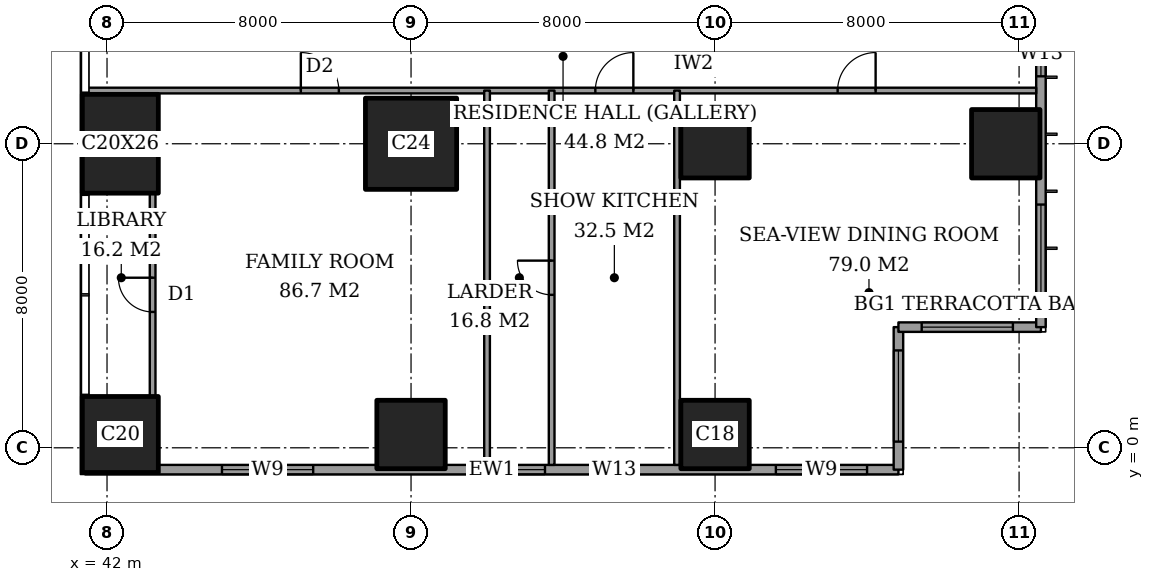
"""IFC4 building model, lengths in metres.
Left out: names, types, materials, properties, quantities, classifications, styles, units other than length and angle.
Written with IfcOpenShell. Run it as: python <this file> out.ifc"""

import sys

from ifc_helpers import new_model, si_unit, direction, frame, frame_2d, origin, origin_2d, place, context, subcontext, project, spatial, rectangle, extrude, element, fill, save


model = new_model("IFC4")
c1 = context("Model", 3, precision=1e-05, world=origin(), true_north=direction((0.0, 1.0)))
c2 = subcontext(c1, "Body", "Model", "MODEL_VIEW")
j1 = project(units=[si_unit("LENGTHUNIT", "METRE"), si_unit("PLANEANGLEUNIT", "RADIAN")], contexts=[c1])
p1 = place(None, origin())
s1 = spatial("IfcSite", under=j1, at=p1, CompositionType="ELEMENT")
p2 = place(p1, origin())
s2 = spatial("IfcBuilding", under=s1, at=p2, CompositionType="ELEMENT")
p3 = place(p2, frame((0.0, 0.0, 207.4)))
s3 = spatial("IfcBuildingStorey", under=s2, at=p3, CompositionType="ELEMENT", Elevation=207.4)
p4 = place(p3, frame((42.35, 0.35, 0.0), z_axis=(0.0, 0.0, 1.0), x_axis=(1.0, 0.0, 0.0)))
e1 = element("IfcColumn", 1, at=p4, inside=s3, PredefinedType="COLUMN", context=c2, shape_type="SweptSolid", body=[
    extrude(rectangle(XDim=2.0, YDim=2.0, at=origin_2d()), origin(), (0.0, 0.0, 1.0), 3.6),
])
p5 = place(p3, frame((42.35, 8.0, 0.0), z_axis=(0.0, 0.0, 1.0), x_axis=(1.0, 0.0, 0.0)))
e2 = element("IfcColumn", 2, at=p5, inside=s3, PredefinedType="COLUMN", context=c2, shape_type="SweptSolid", body=[
    extrude(rectangle(XDim=2.0, YDim=2.6, at=origin_2d()), origin(), (0.0, 0.0, 1.0), 3.6),
])
p6 = place(p3, frame((50.0, 0.35, 0.0), z_axis=(0.0, 0.0, 1.0), x_axis=(1.0, 0.0, 0.0)))
e3 = element("IfcColumn", 3, at=p6, inside=s3, PredefinedType="COLUMN", context=c2, shape_type="SweptSolid", body=[
    extrude(rectangle(XDim=1.8, YDim=1.8, at=origin_2d()), origin(), (0.0, 0.0, 1.0), 3.6),
])
p7 = place(p3, frame((50.0, 8.0, 0.0), z_axis=(0.0, 0.0, 1.0), x_axis=(1.0, 0.0, 0.0)))
e4 = element("IfcColumn", 4, at=p7, inside=s3, PredefinedType="COLUMN", context=c2, shape_type="SweptSolid", body=[
    extrude(rectangle(XDim=2.4, YDim=2.4, at=origin_2d()), origin(), (0.0, 0.0, 1.0), 3.6),
])
for number, where, z_axis, x_axis in (
    (5, (58.0, 0.35, 0.0), (0.0, 0.0, 1.0), (1.0, 0.0, 0.0)),
    (6, (58.0, 8.0, 0.0), (0.0, 0.0, 1.0), (1.0, 0.0, 0.0)),
    (7, (65.65, 8.0, 0.0), (0.0, 0.0, 1.0), (1.0, 0.0, 0.0)),
):
    element("IfcColumn", number, at=place(p3, frame(where, z_axis=z_axis, x_axis=x_axis)), inside=s3, PredefinedType="COLUMN", context=c2, shape_type="SweptSolid", body=[
        extrude(rectangle(XDim=1.8, YDim=1.8, at=origin_2d()), origin(), (0.0, 0.0, 1.0), 3.6),
    ])
p8 = place(p3, frame((41.425, -0.575, 0.0), z_axis=(0.0, 0.0, 1.0), x_axis=(1.0, 0.0, 0.0)))
e8 = element("IfcWall", 8, at=p8, inside=s3, PredefinedType="SOLIDWALL", context=c2, shape_type="SweptSolid", body=[
    extrude(rectangle(XDim=21.4, YDim=0.25, at=frame_2d((10.7, 0.0))), origin(), (0.0, 0.0, 1.0), 3.6),
])
p9 = place(p8, frame((3.6, 0.0, 0.2)))
e9 = element("IfcOpeningElement", 9, at=p9, cuts=e8, PredefinedType="OPENING", context=c2, shape_type="SweptSolid", body=[
    extrude(rectangle(XDim=2.4, YDim=2.4, at=frame_2d((1.2, 1.2))), frame((0.0, 0.135, 0.0), z_axis=(0.0, -1.0, 0.0), x_axis=(1.0, 0.0, 0.0)), (0.0, 0.0, 1.0), 0.27),
])
p10 = place(p8, frame((10.9, 0.0, 0.2)))
e10 = element("IfcOpeningElement", 10, at=p10, cuts=e8, PredefinedType="OPENING", context=c2, shape_type="SweptSolid", body=[
    extrude(rectangle(XDim=1.2, YDim=2.4, at=frame_2d((0.6, 1.2))), frame((0.0, 0.135, 0.0), z_axis=(0.0, -1.0, 0.0), x_axis=(1.0, 0.0, 0.0)), (0.0, 0.0, 1.0), 0.27),
])
p11 = place(p8, frame((13.325, 0.0, 0.2)))
e11 = element("IfcOpeningElement", 11, at=p11, cuts=e8, PredefinedType="OPENING", context=c2, shape_type="SweptSolid", body=[
    extrude(rectangle(XDim=1.2, YDim=2.4, at=frame_2d((0.6, 1.2))), frame((0.0, 0.135, 0.0), z_axis=(0.0, -1.0, 0.0), x_axis=(1.0, 0.0, 0.0)), (0.0, 0.0, 1.0), 0.27),
])
p12 = place(p8, frame((18.175, 0.0, 0.2)))
e12 = element("IfcOpeningElement", 12, at=p12, cuts=e8, PredefinedType="OPENING", context=c2, shape_type="SweptSolid", body=[
    extrude(rectangle(XDim=2.4, YDim=2.4, at=frame_2d((1.2, 1.2))), frame((0.0, 0.135, 0.0), z_axis=(0.0, -1.0, 0.0), x_axis=(1.0, 0.0, 0.0)), (0.0, 0.0, 1.0), 0.27),
])
p13 = place(p3, frame((62.825, -0.575, 0.0), z_axis=(0.0, 0.0, 1.0), x_axis=(0.0, 1.0, 0.0)))
e13 = element("IfcWall", 13, at=p13, inside=s3, PredefinedType="SOLIDWALL", context=c2, shape_type="SweptSolid", body=[
    extrude(rectangle(XDim=3.75, YDim=0.25, at=frame_2d((1.875, 0.0))), origin(), (0.0, 0.0, 1.0), 3.6),
])
p14 = place(p13, frame((0.738, 0.0, 0.2)))
e14 = element("IfcOpeningElement", 14, at=p14, cuts=e13, PredefinedType="OPENING", context=c2, shape_type="SweptSolid", body=[
    extrude(rectangle(XDim=2.4, YDim=2.4, at=frame_2d((1.2, 1.2))), frame((0.0, 0.135, 0.0), z_axis=(0.0, -1.0, 0.0), x_axis=(1.0, 0.0, 0.0)), (0.0, 0.0, 1.0), 0.27),
])
p15 = place(p3, frame((62.825, 3.175, 0.0), z_axis=(0.0, 0.0, 1.0), x_axis=(1.0, 0.0, 0.0)))
e15 = element("IfcWall", 15, at=p15, inside=s3, PredefinedType="SOLIDWALL", context=c2, shape_type="SweptSolid", body=[
    extrude(rectangle(XDim=3.75, YDim=0.25, at=frame_2d((1.875, 0.0))), origin(), (0.0, 0.0, 1.0), 3.6),
])
p16 = place(p15, frame((0.613, 0.0, 0.2)))
e16 = element("IfcOpeningElement", 16, at=p16, cuts=e15, PredefinedType="OPENING", context=c2, shape_type="SweptSolid", body=[
    extrude(rectangle(XDim=2.4, YDim=2.4, at=frame_2d((1.2, 1.2))), frame((0.0, 0.135, 0.0), z_axis=(0.0, -1.0, 0.0), x_axis=(1.0, 0.0, 0.0)), (0.0, 0.0, 1.0), 0.27),
])
p17 = place(p3, frame((66.575, 3.175, 0.0), z_axis=(0.0, 0.0, 1.0), x_axis=(0.0, 1.0, 0.0)))
e17 = element("IfcWall", 17, at=p17, inside=s3, PredefinedType="SOLIDWALL", context=c2, shape_type="SweptSolid", body=[
    extrude(rectangle(XDim=41.65, YDim=0.25, at=frame_2d((20.825, 0.0))), origin(), (0.0, 0.0, 1.0), 3.6),
])
p18 = place(p17, frame((0.825, 0.0, 0.2)))
e18 = element("IfcOpeningElement", 18, at=p18, cuts=e17, PredefinedType="OPENING", context=c2, shape_type="SweptSolid", body=[
    extrude(rectangle(XDim=2.4, YDim=2.4, at=frame_2d((1.2, 1.2))), frame((0.0, 0.135, 0.0), z_axis=(0.0, -1.0, 0.0), x_axis=(1.0, 0.0, 0.0)), (0.0, 0.0, 1.0), 0.27),
])
p19 = place(p17, frame((6.6, 0.0, 0.2)))
e19 = element("IfcOpeningElement", 19, at=p19, cuts=e17, PredefinedType="OPENING", context=c2, shape_type="SweptSolid", body=[
    extrude(rectangle(XDim=1.2, YDim=2.4, at=frame_2d((0.6, 1.2))), frame((0.0, 0.135, 0.0), z_axis=(0.0, -1.0, 0.0), x_axis=(1.0, 0.0, 0.0)), (0.0, 0.0, 1.0), 0.27),
])
p20 = place(p17, frame((8.775, 0.0, 0.2)))
e20 = element("IfcOpeningElement", 20, at=p20, cuts=e17, PredefinedType="OPENING", context=c2, shape_type="SweptSolid", body=[
    extrude(rectangle(XDim=2.4, YDim=2.4, at=frame_2d((1.2, 1.2))), frame((0.0, 0.135, 0.0), z_axis=(0.0, -1.0, 0.0), x_axis=(1.0, 0.0, 0.0)), (0.0, 0.0, 1.0), 0.27),
])
p21 = place(p17, frame((15.675, 0.0, 0.2)))
e21 = element("IfcOpeningElement", 21, at=p21, cuts=e17, PredefinedType="OPENING", context=c2, shape_type="SweptSolid", body=[
    extrude(rectangle(XDim=2.4, YDim=2.4, at=frame_2d((1.2, 1.2))), frame((0.0, 0.135, 0.0), z_axis=(0.0, -1.0, 0.0), x_axis=(1.0, 0.0, 0.0)), (0.0, 0.0, 1.0), 0.27),
])
p22 = place(p17, frame((23.575, 0.0, 0.2)))
e22 = element("IfcOpeningElement", 22, at=p22, cuts=e17, PredefinedType="OPENING", context=c2, shape_type="SweptSolid", body=[
    extrude(rectangle(XDim=2.4, YDim=2.4, at=frame_2d((1.2, 1.2))), frame((0.0, 0.135, 0.0), z_axis=(0.0, -1.0, 0.0), x_axis=(1.0, 0.0, 0.0)), (0.0, 0.0, 1.0), 0.27),
])
p23 = place(p17, frame((30.675, 0.0, 0.2)))
e23 = element("IfcOpeningElement", 23, at=p23, cuts=e17, PredefinedType="OPENING", context=c2, shape_type="SweptSolid", body=[
    extrude(rectangle(XDim=2.4, YDim=2.4, at=frame_2d((1.2, 1.2))), frame((0.0, 0.135, 0.0), z_axis=(0.0, -1.0, 0.0), x_axis=(1.0, 0.0, 0.0)), (0.0, 0.0, 1.0), 0.27),
])
p24 = place(p17, frame((34.325, 0.0, 0.2)))
e24 = element("IfcOpeningElement", 24, at=p24, cuts=e17, PredefinedType="OPENING", context=c2, shape_type="SweptSolid", body=[
    extrude(rectangle(XDim=1.2, YDim=2.4, at=frame_2d((0.6, 1.2))), frame((0.0, 0.135, 0.0), z_axis=(0.0, -1.0, 0.0), x_axis=(1.0, 0.0, 0.0)), (0.0, 0.0, 1.0), 0.27),
])
p25 = place(p17, frame((38.425, 0.0, 0.2)))
e25 = element("IfcOpeningElement", 25, at=p25, cuts=e17, PredefinedType="OPENING", context=c2, shape_type="SweptSolid", body=[
    extrude(rectangle(XDim=2.4, YDim=2.4, at=frame_2d((1.2, 1.2))), frame((0.0, 0.135, 0.0), z_axis=(0.0, -1.0, 0.0), x_axis=(1.0, 0.0, 0.0)), (0.0, 0.0, 1.0), 0.27),
])
p26 = place(p3, frame((41.439, 9.4, 0.0), z_axis=(0.0, 0.0, 1.0), x_axis=(1.0, 0.0, 0.0)))
e26 = element("IfcWall", 26, at=p26, inside=s3, PredefinedType="PARTITIONING", context=c2, shape_type="SweptSolid", body=[
    extrude(rectangle(XDim=25.011, YDim=0.15, at=frame_2d((12.505, 0.0))), origin(), (0.0, 0.0, 1.0), 3.35),
])
p27 = place(p26, frame((19.786, 0.0, 0.0)))
e27 = element("IfcOpeningElement", 27, at=p27, cuts=e26, PredefinedType="OPENING", context=c2, shape_type="SweptSolid", body=[
    extrude(rectangle(XDim=1.0, YDim=2.1, at=frame_2d((0.5, 1.05))), frame((0.0, 0.085, 0.0), z_axis=(0.0, -1.0, 0.0), x_axis=(1.0, 0.0, 0.0)), (0.0, 0.0, 1.0), 0.17),
])
p28 = place(p26, frame((13.411, 0.0, 0.0)))
e28 = element("IfcOpeningElement", 28, at=p28, cuts=e26, PredefinedType="OPENING", context=c2, shape_type="SweptSolid", body=[
    extrude(rectangle(XDim=1.0, YDim=2.1, at=frame_2d((0.5, 1.05))), frame((0.0, 0.085, 0.0), z_axis=(0.0, -1.0, 0.0), x_axis=(1.0, 0.0, 0.0)), (0.0, 0.0, 1.0), 0.17),
])
p29 = place(p26, frame((5.661, 0.0, 0.0)))
e29 = element("IfcOpeningElement", 29, at=p29, cuts=e26, PredefinedType="OPENING", context=c2, shape_type="SweptSolid", body=[
    extrude(rectangle(XDim=1.0, YDim=2.1, at=frame_2d((0.5, 1.05))), frame((0.0, 0.085, 0.0), z_axis=(0.0, -1.0, 0.0), x_axis=(1.0, 0.0, 0.0)), (0.0, 0.0, 1.0), 0.17),
])
p30 = place(p3, frame((43.2, 1.35, 0.0), z_axis=(0.0, 0.0, 1.0), x_axis=(0.0, 1.0, 0.0)))
e30 = element("IfcWall", 30, at=p30, inside=s3, PredefinedType="PARTITIONING", context=c2, shape_type="SweptSolid", body=[
    extrude(rectangle(XDim=5.35, YDim=0.15, at=frame_2d((2.675, 0.0))), origin(), (0.0, 0.0, 1.0), 3.35),
])
p31 = place(p30, frame((2.225, 0.0, 0.0)))
e31 = element("IfcOpeningElement", 31, at=p31, cuts=e30, PredefinedType="OPENING", context=c2, shape_type="SweptSolid", body=[
    extrude(rectangle(XDim=0.9, YDim=2.1, at=frame_2d((0.45, 1.05))), frame((0.0, 0.085, 0.0), z_axis=(0.0, -1.0, 0.0), x_axis=(1.0, 0.0, 0.0)), (0.0, 0.0, 1.0), 0.17),
])
p32 = place(p3, frame((52.0, -0.45, 0.0), z_axis=(0.0, 0.0, 1.0), x_axis=(0.0, 1.0, 0.0)))
e32 = element("IfcWall", 32, at=p32, inside=s3, PredefinedType="PARTITIONING", context=c2, shape_type="SweptSolid", body=[
    extrude(rectangle(XDim=9.85, YDim=0.15, at=frame_2d((4.925, 0.0))), origin(), (0.0, 0.0, 1.0), 3.35),
])
p33 = place(p3, frame((53.7, -0.45, 0.0), z_axis=(0.0, 0.0, 1.0), x_axis=(0.0, 1.0, 0.0)))
e33 = element("IfcWall", 33, at=p33, inside=s3, PredefinedType="PARTITIONING", context=c2, shape_type="SweptSolid", body=[
    extrude(rectangle(XDim=9.85, YDim=0.15, at=frame_2d((4.925, 0.0))), origin(), (0.0, 0.0, 1.0), 3.35),
])
p34 = place(p33, frame((4.475, 0.0, 0.0)))
e34 = element("IfcOpeningElement", 34, at=p34, cuts=e33, PredefinedType="OPENING", context=c2, shape_type="SweptSolid", body=[
    extrude(rectangle(XDim=0.9, YDim=2.1, at=frame_2d((0.45, 1.05))), frame((0.0, 0.085, 0.0), z_axis=(0.0, -1.0, 0.0), x_axis=(1.0, 0.0, 0.0)), (0.0, 0.0, 1.0), 0.17),
])
p35 = place(p3, frame((57.0, -0.45, 0.0), z_axis=(0.0, 0.0, 1.0), x_axis=(0.0, 1.0, 0.0)))
e35 = element("IfcWall", 35, at=p35, inside=s3, PredefinedType="PARTITIONING", context=c2, shape_type="SweptSolid", body=[
    extrude(rectangle(XDim=9.85, YDim=0.15, at=frame_2d((4.925, 0.0))), origin(), (0.0, 0.0, 1.0), 3.35),
])
p36 = place(p9, origin())
e36 = element("IfcWindow", 36, at=p36, inside=s3, PartitioningType="SINGLE_PANEL", PredefinedType="WINDOW", context=c2, shape_type="SweptSolid", body=[
    extrude(rectangle(XDim=2.4, YDim=2.4, at=frame_2d((1.2, 1.2))), frame((0.0, 0.03, 0.0), z_axis=(0.0, -1.0, 0.0), x_axis=(1.0, 0.0, 0.0)), (0.0, 0.0, 1.0), 0.06),
])
fill(e9, e36)
p37 = place(p10, origin())
e37 = element("IfcWindow", 37, at=p37, inside=s3, PartitioningType="SINGLE_PANEL", PredefinedType="WINDOW", context=c2, shape_type="SweptSolid", body=[
    extrude(rectangle(XDim=1.2, YDim=2.4, at=frame_2d((0.6, 1.2))), frame((0.0, 0.03, 0.0), z_axis=(0.0, -1.0, 0.0), x_axis=(1.0, 0.0, 0.0)), (0.0, 0.0, 1.0), 0.06),
])
fill(e10, e37)
p38 = place(p11, origin())
e38 = element("IfcWindow", 38, at=p38, inside=s3, PartitioningType="SINGLE_PANEL", PredefinedType="WINDOW", context=c2, shape_type="SweptSolid", body=[
    extrude(rectangle(XDim=1.2, YDim=2.4, at=frame_2d((0.6, 1.2))), frame((0.0, 0.03, 0.0), z_axis=(0.0, -1.0, 0.0), x_axis=(1.0, 0.0, 0.0)), (0.0, 0.0, 1.0), 0.06),
])
fill(e11, e38)
p39 = place(p12, origin())
e39 = element("IfcWindow", 39, at=p39, inside=s3, PartitioningType="SINGLE_PANEL", PredefinedType="WINDOW", context=c2, shape_type="SweptSolid", body=[
    extrude(rectangle(XDim=2.4, YDim=2.4, at=frame_2d((1.2, 1.2))), frame((0.0, 0.03, 0.0), z_axis=(0.0, -1.0, 0.0), x_axis=(1.0, 0.0, 0.0)), (0.0, 0.0, 1.0), 0.06),
])
fill(e12, e39)
p40 = place(p14, origin())
e40 = element("IfcWindow", 40, at=p40, inside=s3, PartitioningType="SINGLE_PANEL", PredefinedType="WINDOW", context=c2, shape_type="SweptSolid", body=[
    extrude(rectangle(XDim=2.4, YDim=2.4, at=frame_2d((1.2, 1.2))), frame((0.0, 0.03, 0.0), z_axis=(0.0, -1.0, 0.0), x_axis=(1.0, 0.0, 0.0)), (0.0, 0.0, 1.0), 0.06),
])
fill(e14, e40)
p41 = place(p16, origin())
e41 = element("IfcWindow", 41, at=p41, inside=s3, PartitioningType="SINGLE_PANEL", PredefinedType="WINDOW", context=c2, shape_type="SweptSolid", body=[
    extrude(rectangle(XDim=2.4, YDim=2.4, at=frame_2d((1.2, 1.2))), frame((0.0, 0.03, 0.0), z_axis=(0.0, -1.0, 0.0), x_axis=(1.0, 0.0, 0.0)), (0.0, 0.0, 1.0), 0.06),
])
fill(e16, e41)
p42 = place(p18, origin())
e42 = element("IfcWindow", 42, at=p42, inside=s3, PartitioningType="SINGLE_PANEL", PredefinedType="WINDOW", context=c2, shape_type="SweptSolid", body=[
    extrude(rectangle(XDim=2.4, YDim=2.4, at=frame_2d((1.2, 1.2))), frame((0.0, 0.03, 0.0), z_axis=(0.0, -1.0, 0.0), x_axis=(1.0, 0.0, 0.0)), (0.0, 0.0, 1.0), 0.06),
])
fill(e18, e42)
p43 = place(p19, origin())
e43 = element("IfcWindow", 43, at=p43, inside=s3, PartitioningType="SINGLE_PANEL", PredefinedType="WINDOW", context=c2, shape_type="SweptSolid", body=[
    extrude(rectangle(XDim=1.2, YDim=2.4, at=frame_2d((0.6, 1.2))), frame((0.0, 0.03, 0.0), z_axis=(0.0, -1.0, 0.0), x_axis=(1.0, 0.0, 0.0)), (0.0, 0.0, 1.0), 0.06),
])
fill(e19, e43)
p44 = place(p27, origin())
e44 = element("IfcDoor", 44, at=p44, inside=s3, OperationType="SINGLE_SWING_LEFT", PredefinedType="DOOR", context=c2, shape_type="SweptSolid", body=[
    extrude(rectangle(XDim=1.0, YDim=2.1, at=frame_2d((0.5, 1.05))), frame((0.0, 0.025, 0.0), z_axis=(0.0, -1.0, 0.0), x_axis=(1.0, 0.0, 0.0)), (0.0, 0.0, 1.0), 0.05),
])
fill(e27, e44)
p45 = place(p28, origin())
e45 = element("IfcDoor", 45, at=p45, inside=s3, OperationType="SINGLE_SWING_LEFT", PredefinedType="DOOR", context=c2, shape_type="SweptSolid", body=[
    extrude(rectangle(XDim=1.0, YDim=2.1, at=frame_2d((0.5, 1.05))), frame((0.0, 0.025, 0.0), z_axis=(0.0, -1.0, 0.0), x_axis=(1.0, 0.0, 0.0)), (0.0, 0.0, 1.0), 0.05),
])
fill(e28, e45)
p46 = place(p34, origin())
e46 = element("IfcDoor", 46, at=p46, inside=s3, OperationType="SINGLE_SWING_LEFT", PredefinedType="DOOR", context=c2, shape_type="SweptSolid", body=[
    extrude(rectangle(XDim=0.9, YDim=2.1, at=frame_2d((0.45, 1.05))), frame((0.0, 0.025, 0.0), z_axis=(0.0, -1.0, 0.0), x_axis=(1.0, 0.0, 0.0)), (0.0, 0.0, 1.0), 0.05),
])
fill(e34, e46)
p47 = place(p29, origin())
e47 = element("IfcDoor", 47, at=p47, inside=s3, OperationType="SINGLE_SWING_RIGHT", PredefinedType="DOOR", context=c2, shape_type="SweptSolid", body=[
    extrude(rectangle(XDim=1.0, YDim=2.1, at=frame_2d((0.5, 1.05))), frame((0.0, 0.025, 0.0), z_axis=(0.0, -1.0, 0.0), x_axis=(1.0, 0.0, 0.0)), (0.0, 0.0, 1.0), 0.05),
])
fill(e29, e47)
p48 = place(p31, origin())
e48 = element("IfcDoor", 48, at=p48, inside=s3, OperationType="SINGLE_SWING_LEFT", PredefinedType="DOOR", context=c2, shape_type="SweptSolid", body=[
    extrude(rectangle(XDim=0.9, YDim=2.1, at=frame_2d((0.45, 1.05))), frame((0.0, 0.025, 0.0), z_axis=(0.0, -1.0, 0.0), x_axis=(1.0, 0.0, 0.0)), (0.0, 0.0, 1.0), 0.05),
])
fill(e31, e48)
save(model, sys.argv[1])
